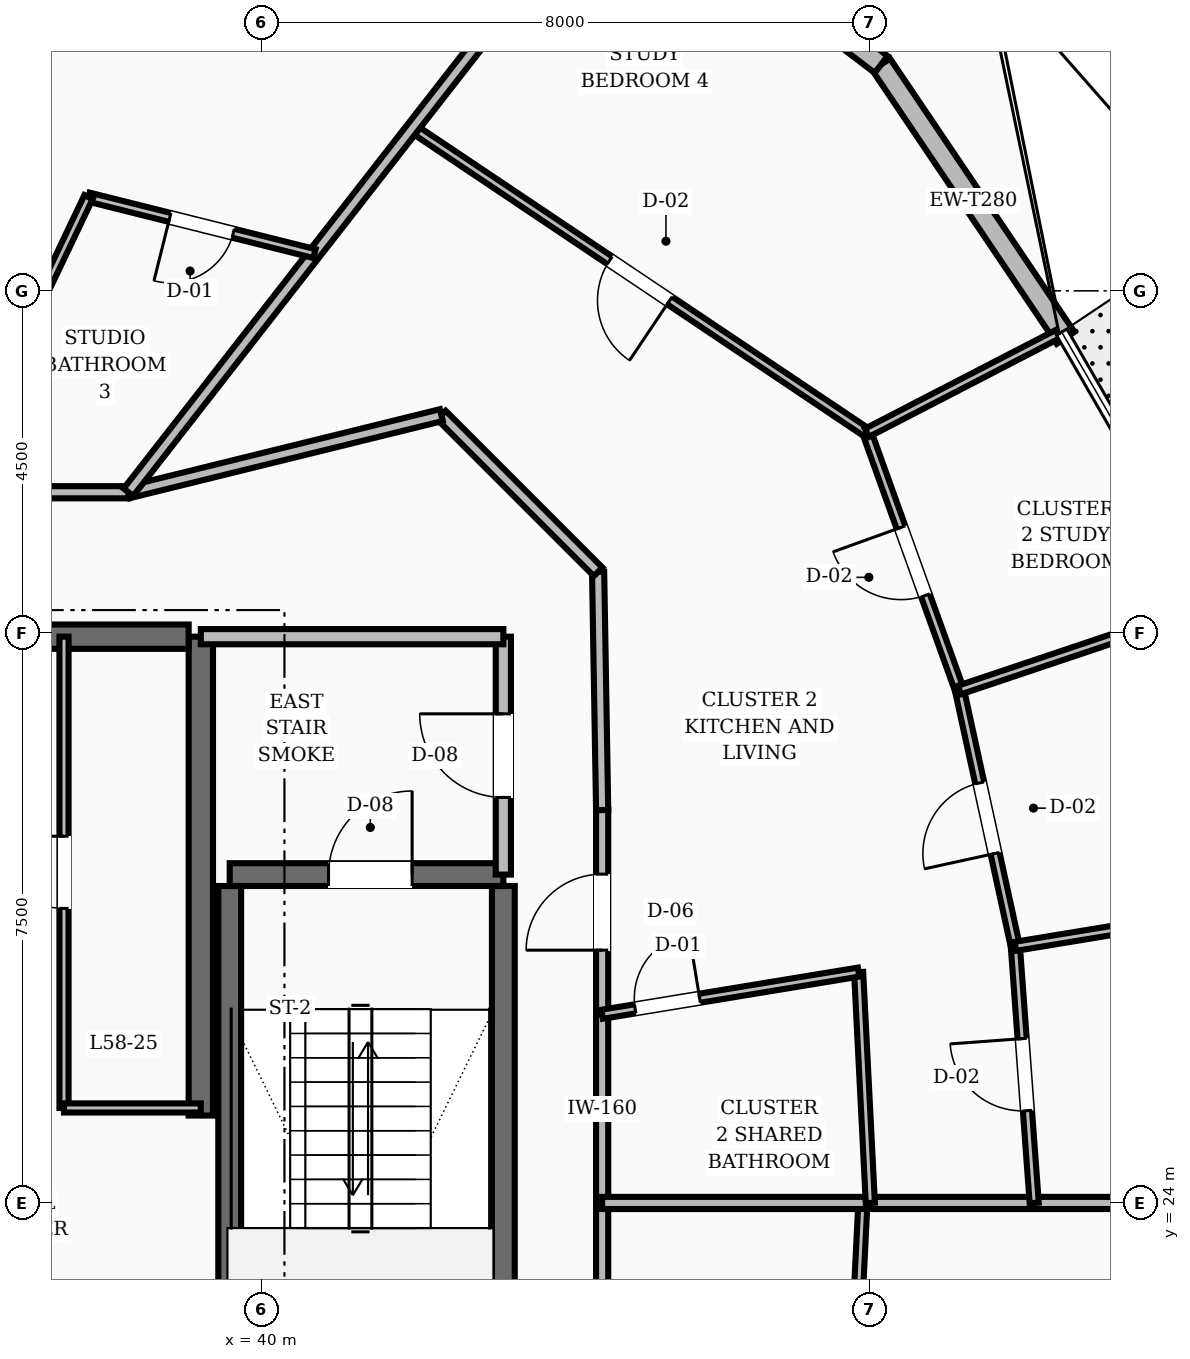
"""IFC4 building model, lengths in metres.
Left out: names, types, materials, properties, quantities, classifications, styles, units other than length and angle.
Written with IfcOpenShell. Run it as: python <this file> out.ifc"""

import sys

from ifc_helpers import new_model, si_unit, direction, frame, frame_2d, origin, place, context, subcontext, project, spatial, rectangle, extrude, element, fill, save


model = new_model("IFC4")
c1 = context("Model", 3, precision=1e-05, world=origin(), true_north=direction((0.0, 1.0)))
c2 = subcontext(c1, "Body", "Model", "MODEL_VIEW")
j1 = project(units=[si_unit("LENGTHUNIT", "METRE"), si_unit("PLANEANGLEUNIT", "RADIAN")], contexts=[c1])
p1 = place(None, origin())
s1 = spatial("IfcSite", under=j1, at=p1, CompositionType="ELEMENT")
p2 = place(p1, origin())
s2 = spatial("IfcBuilding", under=s1, at=p2, CompositionType="ELEMENT")
p3 = place(p2, frame((0.0, 0.0, 225.6)))
s3 = spatial("IfcBuildingStorey", under=s2, at=p3, CompositionType="ELEMENT", Elevation=225.6)
p4 = place(p3, frame((39.2, 25.15, 0.0), z_axis=(0.0, 0.0, 1.0), x_axis=(0.0, 1.0, 0.0)))
e1 = element("IfcWall", 1, at=p4, inside=s3, PredefinedType="SHEAR", context=c2, shape_type="SweptSolid", body=[
    extrude(rectangle(XDim=6.3, YDim=0.32, at=frame_2d((3.15, 0.0))), origin(), (0.0, 0.0, 1.0), 3.6),
])
p5 = place(p3, frame((35.8, 31.45, 0.0), z_axis=(0.0, 0.0, 1.0), x_axis=(1.0, 0.0, 0.0)))
e2 = element("IfcWall", 2, at=p5, inside=s3, PredefinedType="SHEAR", context=c2, shape_type="SweptSolid", body=[
    extrude(rectangle(XDim=3.24, YDim=0.32, at=frame_2d((1.62, 0.0))), origin(), (0.0, 0.0, 1.0), 3.6),
])
p6 = place(p5, frame((0.3, 0.0, 0.0)))
e3 = element("IfcOpeningElement", 3, at=p6, cuts=e2, PredefinedType="OPENING", context=c2, shape_type="SweptSolid", body=[
    extrude(rectangle(XDim=1.1, YDim=2.1, at=frame_2d((0.55, 1.05))), frame((0.0, 0.17, 0.0), z_axis=(0.0, -1.0, 0.0), x_axis=(1.0, 0.0, 0.0)), (0.0, 0.0, 1.0), 0.34),
])
for number, where, z_axis, x_axis in (
    (4, (43.18, 19.43, 0.0), (0.0, 0.0, 1.0), (0.0, 1.0, 0.0)),
    (5, (39.58, 19.43, 0.0), (0.0, 0.0, 1.0), (0.0, 1.0, 0.0)),
):
    element("IfcWall", number, at=place(p3, frame(where, z_axis=z_axis, x_axis=x_axis)), inside=s3, PredefinedType="SHEAR", context=c2, shape_type="SweptSolid", body=[
        extrude(rectangle(XDim=8.74, YDim=0.3, at=frame_2d((4.37, 0.0))), origin(), (0.0, 0.0, 1.0), 3.6),
    ])
p7 = place(p3, frame((39.58, 28.32, 0.0), z_axis=(0.0, 0.0, 1.0), x_axis=(1.0, 0.0, 0.0)))
e6 = element("IfcWall", 6, at=p7, inside=s3, PredefinedType="SHEAR", context=c2, shape_type="SweptSolid", body=[
    extrude(rectangle(XDim=3.6, YDim=0.3, at=frame_2d((1.8, 0.0))), origin(), (0.0, 0.0, 1.0), 3.6),
])
p8 = place(p7, frame((1.3, 0.0, 0.0)))
e7 = element("IfcOpeningElement", 7, at=p8, cuts=e6, PredefinedType="OPENING", context=c2, shape_type="SweptSolid", body=[
    extrude(rectangle(XDim=1.1, YDim=2.1, at=frame_2d((0.55, 1.05))), frame((0.0, 0.16, 0.0), z_axis=(0.0, -1.0, 0.0), x_axis=(1.0, 0.0, 0.0)), (0.0, 0.0, 1.0), 0.32),
])
p9 = place(p3, frame((50.577, 35.381, 0.0), z_axis=(0.0, 0.0, 1.0), x_axis=(-0.559158756737, 0.829060603795, 0.0)))
e8 = element("IfcWall", 8, at=p9, inside=s3, PredefinedType="STANDARD", context=c2, shape_type="SweptSolid", body=[
    extrude(rectangle(XDim=4.339, YDim=0.28, at=frame_2d((2.169, 0.0))), origin(), (0.0, 0.0, 1.0), 2.88),
])
p10 = place(p3, frame((48.151, 38.978, 0.0), z_axis=(0.0, 0.0, 1.0), x_axis=(-0.795722836513, 0.605660934394, 0.0)))
e9 = element("IfcWall", 9, at=p10, inside=s3, PredefinedType="STANDARD", context=c2, shape_type="SweptSolid", body=[
    extrude(rectangle(XDim=4.349, YDim=0.28, at=frame_2d((2.175, 0.0))), origin(), (0.0, 0.0, 1.0), 2.88),
])
p11 = place(p10, frame((0.875, 0.0, 0.8)))
e10 = element("IfcOpeningElement", 10, at=p11, cuts=e9, PredefinedType="OPENING", context=c2, shape_type="SweptSolid", body=[
    extrude(rectangle(XDim=2.6, YDim=1.65, at=frame_2d((1.3, 0.825))), frame((0.0, 0.15, 0.0), z_axis=(0.0, -1.0, 0.0), x_axis=(1.0, 0.0, 0.0)), (0.0, 0.0, 1.0), 0.3),
])
p12 = place(p3, frame((43.18, 28.32, 0.0), z_axis=(0.0, 0.0, 1.0), x_axis=(0.0, 1.0, 0.0)))
e11 = element("IfcWall", 11, at=p12, inside=s3, PredefinedType="SOLIDWALL", context=c2, shape_type="SweptSolid", body=[
    extrude(rectangle(XDim=3.13, YDim=0.2, at=frame_2d((1.565, 0.0))), origin(), (0.0, 0.0, 1.0), 2.87),
])
p13 = place(p12, frame((1.015, 0.0, 0.0)))
e12 = element("IfcOpeningElement", 12, at=p13, cuts=e11, PredefinedType="OPENING", context=c2, shape_type="SweptSolid", body=[
    extrude(rectangle(XDim=1.1, YDim=2.1, at=frame_2d((0.55, 1.05))), frame((0.0, 0.11, 0.0), z_axis=(0.0, -1.0, 0.0), x_axis=(1.0, 0.0, 0.0)), (0.0, 0.0, 1.0), 0.22),
])
p14 = place(p3, frame((39.2, 31.45, 0.0), z_axis=(0.0, 0.0, 1.0), x_axis=(1.0, 0.0, 0.0)))
e13 = element("IfcWall", 13, at=p14, inside=s3, PredefinedType="SOLIDWALL", context=c2, shape_type="SweptSolid", body=[
    extrude(rectangle(XDim=3.98, YDim=0.2, at=frame_2d((1.99, 0.0))), origin(), (0.0, 0.0, 1.0), 2.87),
])
p15 = place(p3, frame((37.4, 25.25, 0.0), z_axis=(0.0, 0.0, 1.0), x_axis=(0.0, 1.0, 0.0)))
e14 = element("IfcWall", 14, at=p15, inside=s3, PredefinedType="PARTITIONING", context=c2, shape_type="SweptSolid", body=[
    extrude(rectangle(XDim=6.2, YDim=0.12, at=frame_2d((3.1, 0.0))), origin(), (0.0, 0.0, 1.0), 2.87),
])
p16 = place(p15, frame((2.625, 0.0, 0.0)))
e15 = element("IfcOpeningElement", 15, at=p16, cuts=e14, PredefinedType="OPENING", context=c2, shape_type="SweptSolid", body=[
    extrude(rectangle(XDim=0.95, YDim=2.1, at=frame_2d((0.475, 1.05))), frame((0.0, 0.07, 0.0), z_axis=(0.0, -1.0, 0.0), x_axis=(1.0, 0.0, 0.0)), (0.0, 0.0, 1.0), 0.14),
])
p17 = place(p3, frame((37.4, 25.25, 0.0), z_axis=(0.0, 0.0, 1.0), x_axis=(1.0, 0.0, 0.0)))
e16 = element("IfcWall", 16, at=p17, inside=s3, PredefinedType="PARTITIONING", context=c2, shape_type="SweptSolid", body=[
    extrude(rectangle(XDim=1.8, YDim=0.12, at=frame_2d((0.9, 0.0))), origin(), (0.0, 0.0, 1.0), 2.87),
])
p18 = place(p3, frame((44.48, 24.0, 0.0), z_axis=(0.0, 0.0, 1.0), x_axis=(0.0, 1.0, 0.0)))
e17 = element("IfcWall", 17, at=p18, inside=s3, PredefinedType="SOLIDWALL", context=c2, shape_type="SweptSolid", body=[
    extrude(rectangle(XDim=2.482, YDim=0.16, at=frame_2d((1.241, 0.0))), origin(), (0.0, 0.0, 1.0), 2.87),
])
p19 = place(p3, frame((44.48, 26.482, 0.0), z_axis=(0.0, 0.0, 1.0), x_axis=(0.0, 1.0, 0.0)))
e18 = element("IfcWall", 18, at=p19, inside=s3, PredefinedType="SOLIDWALL", context=c2, shape_type="SweptSolid", body=[
    extrude(rectangle(XDim=2.687, YDim=0.16, at=frame_2d((1.344, 0.0))), origin(), (0.0, 0.0, 1.0), 2.87),
])
p20 = place(p19, frame((0.844, 0.0, 0.0)))
e19 = element("IfcOpeningElement", 19, at=p20, cuts=e18, PredefinedType="OPENING", context=c2, shape_type="SweptSolid", body=[
    extrude(rectangle(XDim=1.0, YDim=2.1, at=frame_2d((0.5, 1.05))), frame((0.0, 0.09, 0.0), z_axis=(0.0, -1.0, 0.0), x_axis=(1.0, 0.0, 0.0)), (0.0, 0.0, 1.0), 0.18),
])
p21 = place(p3, frame((44.48, 29.169, 0.0), z_axis=(0.0, 0.0, 1.0), x_axis=(-0.016981035134, 0.999855811828, 0.0)))
e20 = element("IfcWall", 20, at=p21, inside=s3, PredefinedType="SOLIDWALL", context=c2, shape_type="SweptSolid", body=[
    extrude(rectangle(XDim=3.134, YDim=0.16, at=frame_2d((1.567, 0.0))), origin(), (0.0, 0.0, 1.0), 2.87),
])
p22 = place(p3, frame((44.427, 32.303, 0.0), z_axis=(0.0, 0.0, 1.0), x_axis=(-0.707106781187, 0.707106781187, 0.0)))
e21 = element("IfcWall", 21, at=p22, inside=s3, PredefinedType="SOLIDWALL", context=c2, shape_type="SweptSolid", body=[
    extrude(rectangle(XDim=2.916, YDim=0.16, at=frame_2d((1.458, 0.0))), origin(), (0.0, 0.0, 1.0), 2.87),
])
p23 = place(p3, frame((42.365, 34.365, 0.0), z_axis=(0.0, 0.0, 1.0), x_axis=(-0.970939799552, -0.239323850978, 0.0)))
e22 = element("IfcWall", 22, at=p23, inside=s3, PredefinedType="SOLIDWALL", context=c2, shape_type="SweptSolid", body=[
    extrude(rectangle(XDim=4.241, YDim=0.16, at=frame_2d((2.12, 0.0))), origin(), (0.0, 0.0, 1.0), 2.87),
])
p24 = place(p3, frame((38.248, 33.35, 0.0), z_axis=(0.0, 0.0, 1.0), x_axis=(-1.0, 0.0, 0.0)))
e23 = element("IfcWall", 23, at=p24, inside=s3, PredefinedType="SOLIDWALL", context=c2, shape_type="SweptSolid", body=[
    extrude(rectangle(XDim=2.375, YDim=0.16, at=frame_2d((1.188, 0.0))), origin(), (0.0, 0.0, 1.0), 2.87),
])
p25 = place(p3, frame((44.48, 21.518, 0.0), z_axis=(0.0, 0.0, 1.0), x_axis=(0.0, 1.0, 0.0)))
e24 = element("IfcWall", 24, at=p25, inside=s3, PredefinedType="SOLIDWALL", context=c2, shape_type="SweptSolid", body=[
    extrude(rectangle(XDim=2.482, YDim=0.16, at=frame_2d((1.241, 0.0))), origin(), (0.0, 0.0, 1.0), 2.87),
])
p26 = place(p3, frame((47.76, 20.978, 0.0), z_axis=(0.0, 0.0, 1.0), x_axis=(0.049466716378, 0.998775772619, 0.0)))
e25 = element("IfcWall", 25, at=p26, inside=s3, PredefinedType="PARTITIONING", context=c2, shape_type="SweptSolid", body=[
    extrude(rectangle(XDim=3.025, YDim=0.12, at=frame_2d((1.513, 0.0))), origin(), (0.0, 0.0, 1.0), 2.87),
])
p27 = place(p3, frame((44.48, 24.0, 0.0), z_axis=(0.0, 0.0, 1.0), x_axis=(1.0, 0.0, 0.0)))
e26 = element("IfcWall", 26, at=p27, inside=s3, PredefinedType="SOLIDWALL", context=c2, shape_type="SweptSolid", body=[
    extrude(rectangle(XDim=9.751, YDim=0.16, at=frame_2d((4.875, 0.0))), origin(), (0.0, 0.0, 1.0), 2.87),
])
p28 = place(p3, frame((48.008, 24.0, 0.0), z_axis=(0.0, 0.0, 1.0), x_axis=(-0.050738421971, 0.998711976766, 0.0)))
e27 = element("IfcWall", 27, at=p28, inside=s3, PredefinedType="PARTITIONING", context=c2, shape_type="SweptSolid", body=[
    extrude(rectangle(XDim=3.041, YDim=0.12, at=frame_2d((1.521, 0.0))), origin(), (0.0, 0.0, 1.0), 2.87),
])
p29 = place(p3, frame((44.48, 26.482, 0.0), z_axis=(0.0, 0.0, 1.0), x_axis=(0.986754313542, 0.162221837943, 0.0)))
e28 = element("IfcWall", 28, at=p29, inside=s3, PredefinedType="PARTITIONING", context=c2, shape_type="SweptSolid", body=[
    extrude(rectangle(XDim=3.419, YDim=0.12, at=frame_2d((1.71, 0.0))), origin(), (0.0, 0.0, 1.0), 2.87),
])
p30 = place(p29, frame((0.44, 0.0, 0.0)))
e29 = element("IfcOpeningElement", 29, at=p30, cuts=e28, PredefinedType="OPENING", context=c2, shape_type="SweptSolid", body=[
    extrude(rectangle(XDim=0.86, YDim=2.1, at=frame_2d((0.43, 1.05))), frame((0.0, 0.07, 0.0), z_axis=(0.0, -1.0, 0.0), x_axis=(1.0, 0.0, 0.0)), (0.0, 0.0, 1.0), 0.14),
])
p31 = place(p3, frame((50.164, 24.0, 0.0), z_axis=(0.0, 0.0, 1.0), x_axis=(-0.073343046292, 0.997306772042, 0.0)))
e30 = element("IfcWall", 30, at=p31, inside=s3, PredefinedType="PARTITIONING", context=c2, shape_type="SweptSolid", body=[
    extrude(rectangle(XDim=3.385, YDim=0.12, at=frame_2d((1.693, 0.0))), origin(), (0.0, 0.0, 1.0), 2.87),
])
p32 = place(p31, frame((1.218, 0.0, 0.0)))
e31 = element("IfcOpeningElement", 31, at=p32, cuts=e30, PredefinedType="OPENING", context=c2, shape_type="SweptSolid", body=[
    extrude(rectangle(XDim=0.95, YDim=2.1, at=frame_2d((0.475, 1.05))), frame((0.0, 0.07, 0.0), z_axis=(0.0, -1.0, 0.0), x_axis=(1.0, 0.0, 0.0)), (0.0, 0.0, 1.0), 0.14),
])
p33 = place(p3, frame((49.916, 27.376, 0.0), z_axis=(0.0, 0.0, 1.0), x_axis=(-0.213063946471, 0.977038256525, 0.0)))
e32 = element("IfcWall", 32, at=p33, inside=s3, PredefinedType="PARTITIONING", context=c2, shape_type="SweptSolid", body=[
    extrude(rectangle(XDim=3.451, YDim=0.12, at=frame_2d((1.726, 0.0))), origin(), (0.0, 0.0, 1.0), 2.87),
])
p34 = place(p33, frame((1.251, 0.0, 0.0)))
e33 = element("IfcOpeningElement", 33, at=p34, cuts=e32, PredefinedType="OPENING", context=c2, shape_type="SweptSolid", body=[
    extrude(rectangle(XDim=0.95, YDim=2.1, at=frame_2d((0.475, 1.05))), frame((0.0, 0.07, 0.0), z_axis=(0.0, -1.0, 0.0), x_axis=(1.0, 0.0, 0.0)), (0.0, 0.0, 1.0), 0.14),
])
p35 = place(p3, frame((49.916, 27.376, 0.0), z_axis=(0.0, 0.0, 1.0), x_axis=(0.98675994364, 0.162187587772, 0.0)))
e34 = element("IfcWall", 34, at=p35, inside=s3, PredefinedType="PARTITIONING", context=c2, shape_type="SweptSolid", body=[
    extrude(rectangle(XDim=3.939, YDim=0.12, at=frame_2d((1.97, 0.0))), origin(), (0.0, 0.0, 1.0), 2.87),
])
p36 = place(p3, frame((49.181, 30.748, 0.0), z_axis=(0.0, 0.0, 1.0), x_axis=(-0.33827951378, 0.941045679314, 0.0)))
e35 = element("IfcWall", 35, at=p36, inside=s3, PredefinedType="PARTITIONING", context=c2, shape_type="SweptSolid", body=[
    extrude(rectangle(XDim=3.596, YDim=0.12, at=frame_2d((1.798, 0.0))), origin(), (0.0, 0.0, 1.0), 2.87),
])
p37 = place(p36, frame((1.323, 0.0, 0.0)))
e36 = element("IfcOpeningElement", 36, at=p37, cuts=e35, PredefinedType="OPENING", context=c2, shape_type="SweptSolid", body=[
    extrude(rectangle(XDim=0.95, YDim=2.1, at=frame_2d((0.475, 1.05))), frame((0.0, 0.07, 0.0), z_axis=(0.0, -1.0, 0.0), x_axis=(1.0, 0.0, 0.0)), (0.0, 0.0, 1.0), 0.14),
])
p38 = place(p3, frame((49.181, 30.748, 0.0), z_axis=(0.0, 0.0, 1.0), x_axis=(0.947929060238, 0.318481548534, 0.0)))
e37 = element("IfcWall", 37, at=p38, inside=s3, PredefinedType="PARTITIONING", context=c2, shape_type="SweptSolid", body=[
    extrude(rectangle(XDim=3.541, YDim=0.12, at=frame_2d((1.771, 0.0))), origin(), (0.0, 0.0, 1.0), 2.87),
])
p39 = place(p3, frame((47.964, 34.133, 0.0), z_axis=(0.0, 0.0, 1.0), x_axis=(-0.830591967255, 0.556881481046, 0.0)))
e38 = element("IfcWall", 38, at=p39, inside=s3, PredefinedType="PARTITIONING", context=c2, shape_type="SweptSolid", body=[
    extrude(rectangle(XDim=7.2, YDim=0.12, at=frame_2d((3.6, 0.0))), origin(), (0.0, 0.0, 1.0), 2.87),
])
p40 = place(p39, frame((3.125, 0.0, 0.0)))
e39 = element("IfcOpeningElement", 39, at=p40, cuts=e38, PredefinedType="OPENING", context=c2, shape_type="SweptSolid", body=[
    extrude(rectangle(XDim=0.95, YDim=2.1, at=frame_2d((0.475, 1.05))), frame((0.0, 0.07, 0.0), z_axis=(0.0, -1.0, 0.0), x_axis=(1.0, 0.0, 0.0)), (0.0, 0.0, 1.0), 0.14),
])
p41 = place(p3, frame((47.964, 34.133, 0.0), z_axis=(0.0, 0.0, 1.0), x_axis=(0.888279464534, 0.459303377831, 0.0)))
e40 = element("IfcWall", 40, at=p41, inside=s3, PredefinedType="PARTITIONING", context=c2, shape_type="SweptSolid", body=[
    extrude(rectangle(XDim=2.834, YDim=0.12, at=frame_2d((1.417, 0.0))), origin(), (0.0, 0.0, 1.0), 2.87),
])
p42 = place(p3, frame((38.248, 33.35, 0.0), z_axis=(0.0, 0.0, 1.0), x_axis=(0.614883592215, 0.788617884672, 0.0)))
e41 = element("IfcWall", 41, at=p42, inside=s3, PredefinedType="SOLIDWALL", context=c2, shape_type="SweptSolid", body=[
    extrude(rectangle(XDim=10.427, YDim=0.16, at=frame_2d((5.213, 0.0))), origin(), (0.0, 0.0, 1.0), 2.87),
])
p43 = place(p3, frame((40.696, 36.49, 0.0), z_axis=(0.0, 0.0, 1.0), x_axis=(-0.970090929749, 0.242741813496, 0.0)))
e42 = element("IfcWall", 42, at=p43, inside=s3, PredefinedType="PARTITIONING", context=c2, shape_type="SweptSolid", body=[
    extrude(rectangle(XDim=3.064, YDim=0.12, at=frame_2d((1.532, 0.0))), origin(), (0.0, 0.0, 1.0), 2.87),
])
p44 = place(p43, frame((1.102, 0.0, 0.0)))
e43 = element("IfcOpeningElement", 43, at=p44, cuts=e42, PredefinedType="OPENING", context=c2, shape_type="SweptSolid", body=[
    extrude(rectangle(XDim=0.86, YDim=2.1, at=frame_2d((0.43, 1.05))), frame((0.0, 0.07, 0.0), z_axis=(0.0, -1.0, 0.0), x_axis=(1.0, 0.0, 0.0)), (0.0, 0.0, 1.0), 0.14),
])
p45 = place(p3, frame((35.873, 33.35, 0.0), z_axis=(0.0, 0.0, 1.0), x_axis=(0.430037122425, 0.90281120581, 0.0)))
e44 = element("IfcWall", 44, at=p45, inside=s3, PredefinedType="PARTITIONING", context=c2, shape_type="SweptSolid", body=[
    extrude(rectangle(XDim=4.302, YDim=0.12, at=frame_2d((2.151, 0.0))), origin(), (0.0, 0.0, 1.0), 2.87),
])
p46 = place(p8, origin())
e45 = element("IfcDoor", 45, at=p46, inside=s3, OperationType="SINGLE_SWING_RIGHT", PredefinedType="DOOR", context=c2, shape_type="SweptSolid", body=[
    extrude(rectangle(XDim=1.1, YDim=2.1, at=frame_2d((0.55, 1.05))), frame((0.0, 0.025, 0.0), z_axis=(0.0, -1.0, 0.0), x_axis=(1.0, 0.0, 0.0)), (0.0, 0.0, 1.0), 0.05),
])
fill(e7, e45)
p47 = place(p13, origin())
e46 = element("IfcDoor", 46, at=p47, inside=s3, OperationType="SINGLE_SWING_RIGHT", PredefinedType="DOOR", context=c2, shape_type="SweptSolid", body=[
    extrude(rectangle(XDim=1.1, YDim=2.1, at=frame_2d((0.55, 1.05))), frame((0.0, 0.025, 0.0), z_axis=(0.0, -1.0, 0.0), x_axis=(1.0, 0.0, 0.0)), (0.0, 0.0, 1.0), 0.05),
])
fill(e12, e46)
p48 = place(p16, origin())
e47 = element("IfcDoor", 47, at=p48, inside=s3, OperationType="SINGLE_SWING_RIGHT", PredefinedType="DOOR", context=c2, shape_type="SweptSolid", body=[
    extrude(rectangle(XDim=0.95, YDim=2.1, at=frame_2d((0.475, 1.05))), frame((0.0, 0.025, 0.0), z_axis=(0.0, -1.0, 0.0), x_axis=(1.0, 0.0, 0.0)), (0.0, 0.0, 1.0), 0.05),
])
fill(e15, e47)
p49 = place(p30, origin())
e48 = element("IfcDoor", 48, at=p49, inside=s3, OperationType="SINGLE_SWING_RIGHT", PredefinedType="DOOR", context=c2, shape_type="SweptSolid", body=[
    extrude(rectangle(XDim=0.86, YDim=2.1, at=frame_2d((0.43, 1.05))), frame((0.0, 0.025, 0.0), z_axis=(0.0, -1.0, 0.0), x_axis=(1.0, 0.0, 0.0)), (0.0, 0.0, 1.0), 0.05),
])
fill(e29, e48)
p50 = place(p20, origin())
e49 = element("IfcDoor", 49, at=p50, inside=s3, OperationType="SINGLE_SWING_LEFT", PredefinedType="DOOR", context=c2, shape_type="SweptSolid", body=[
    extrude(rectangle(XDim=1.0, YDim=2.1, at=frame_2d((0.5, 1.05))), frame((0.0, 0.025, 0.0), z_axis=(0.0, -1.0, 0.0), x_axis=(1.0, 0.0, 0.0)), (0.0, 0.0, 1.0), 0.05),
])
fill(e19, e49)
p51 = place(p32, origin())
e50 = element("IfcDoor", 50, at=p51, inside=s3, OperationType="SINGLE_SWING_RIGHT", PredefinedType="DOOR", context=c2, shape_type="SweptSolid", body=[
    extrude(rectangle(XDim=0.95, YDim=2.1, at=frame_2d((0.475, 1.05))), frame((0.0, 0.025, 0.0), z_axis=(0.0, -1.0, 0.0), x_axis=(1.0, 0.0, 0.0)), (0.0, 0.0, 1.0), 0.05),
])
fill(e31, e50)
p52 = place(p34, origin())
e51 = element("IfcDoor", 51, at=p52, inside=s3, OperationType="SINGLE_SWING_LEFT", PredefinedType="DOOR", context=c2, shape_type="SweptSolid", body=[
    extrude(rectangle(XDim=0.95, YDim=2.1, at=frame_2d((0.475, 1.05))), frame((0.0, 0.025, 0.0), z_axis=(0.0, -1.0, 0.0), x_axis=(1.0, 0.0, 0.0)), (0.0, 0.0, 1.0), 0.05),
])
fill(e33, e51)
p53 = place(p37, origin())
e52 = element("IfcDoor", 52, at=p53, inside=s3, OperationType="SINGLE_SWING_RIGHT", PredefinedType="DOOR", context=c2, shape_type="SweptSolid", body=[
    extrude(rectangle(XDim=0.95, YDim=2.1, at=frame_2d((0.475, 1.05))), frame((0.0, 0.025, 0.0), z_axis=(0.0, -1.0, 0.0), x_axis=(1.0, 0.0, 0.0)), (0.0, 0.0, 1.0), 0.05),
])
fill(e36, e52)
p54 = place(p40, origin())
e53 = element("IfcDoor", 53, at=p54, inside=s3, OperationType="SINGLE_SWING_LEFT", PredefinedType="DOOR", context=c2, shape_type="SweptSolid", body=[
    extrude(rectangle(XDim=0.95, YDim=2.1, at=frame_2d((0.475, 1.05))), frame((0.0, 0.025, 0.0), z_axis=(0.0, -1.0, 0.0), x_axis=(1.0, 0.0, 0.0)), (0.0, 0.0, 1.0), 0.05),
])
fill(e39, e53)
p55 = place(p44, origin())
e54 = element("IfcDoor", 54, at=p55, inside=s3, OperationType="SINGLE_SWING_RIGHT", PredefinedType="DOOR", context=c2, shape_type="SweptSolid", body=[
    extrude(rectangle(XDim=0.86, YDim=2.1, at=frame_2d((0.43, 1.05))), frame((0.0, 0.025, 0.0), z_axis=(0.0, -1.0, 0.0), x_axis=(1.0, 0.0, 0.0)), (0.0, 0.0, 1.0), 0.05),
])
fill(e43, e54)
save(model, sys.argv[1])
